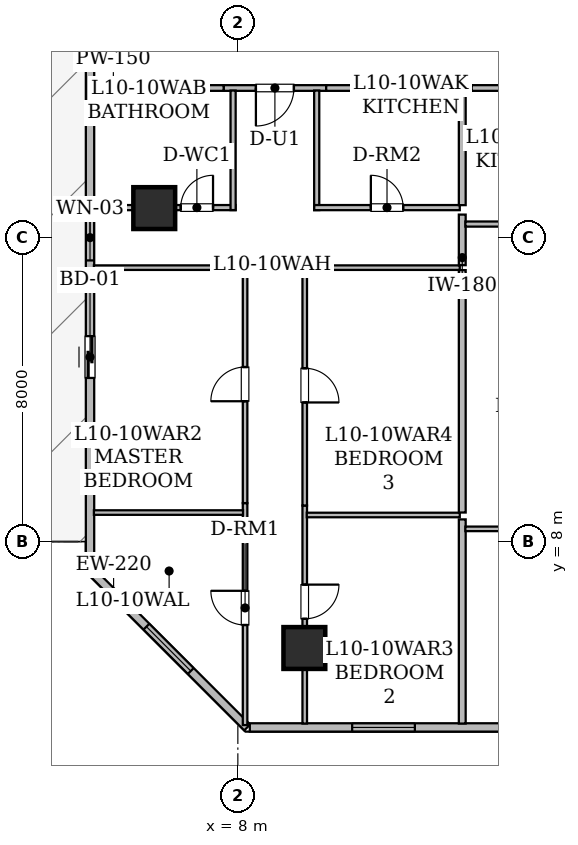
"""IFC4 building model, lengths in metres.
Left out: names, types, materials, properties, quantities, classifications, styles, units other than length and angle.
Written with IfcOpenShell. Run it as: python <this file> out.ifc"""

import sys

from ifc_helpers import new_model, si_unit, direction, frame, frame_2d, origin, origin_2d, place, context, subcontext, project, spatial, rectangle, hollow_rectangle, extrude, element, fill, save


model = new_model("IFC4")
c1 = context("Model", 3, precision=1e-05, world=origin(), true_north=direction((0.0, 1.0)))
c2 = subcontext(c1, "Body", "Model", "MODEL_VIEW")
j1 = project(units=[si_unit("LENGTHUNIT", "METRE"), si_unit("PLANEANGLEUNIT", "RADIAN")], contexts=[c1])
p1 = place(None, origin())
s1 = spatial("IfcSite", under=j1, at=p1, CompositionType="ELEMENT")
p2 = place(p1, origin())
s2 = spatial("IfcBuilding", under=s1, at=p2, CompositionType="ELEMENT")
p3 = place(p2, frame((0.0, 0.0, 44.25)))
s3 = spatial("IfcBuildingStorey", under=s2, at=p3, CompositionType="ELEMENT", Elevation=44.25)
for number, where, z_axis, x_axis in (
    (1, (9.75, 5.2, 0.0), (0.0, 0.0, 1.0), (1.0, 0.0, 0.0)),
    (2, (5.8, 16.775, 0.0), (0.0, 0.0, 1.0), (1.0, 0.0, 0.0)),
):
    element("IfcColumn", number, at=place(p3, frame(where, z_axis=z_axis, x_axis=x_axis)), inside=s3, PredefinedType="COLUMN", context=c2, shape_type="SweptSolid", body=[
        extrude(hollow_rectangle(XDim=1.1, YDim=1.1, WallThickness=0.055, at=origin_2d()), origin(), (0.0, 0.0, 1.0), 3.65),
    ])
p4 = place(p3, frame((8.246, 3.11, 0.0), z_axis=(0.0, 0.0, 1.0), x_axis=(-0.707106781187, 0.707106781187, 0.0)))
e3 = element("IfcWall", 3, at=p4, inside=s3, PredefinedType="STANDARD", context=c2, shape_type="SweptSolid", body=[
    extrude(rectangle(XDim=5.849, YDim=0.22, at=frame_2d((2.925, 0.0))), origin(), (0.0, 0.0, 1.0), 3.43),
])
p5 = place(p4, frame((2.1, 0.0, 0.85)))
e4 = element("IfcOpeningElement", 4, at=p5, cuts=e3, PredefinedType="OPENING", context=c2, shape_type="SweptSolid", body=[
    extrude(rectangle(XDim=1.65, YDim=1.55, at=frame_2d((0.825, 0.775))), frame((0.0, 0.12, 0.0), z_axis=(0.0, -1.0, 0.0), x_axis=(1.0, 0.0, 0.0)), (0.0, 0.0, 1.0), 0.24),
])
p6 = place(p3, frame((4.11, 7.317, 0.0), z_axis=(0.0, 0.0, 1.0), x_axis=(0.0, 1.0, 0.0)))
e5 = element("IfcWall", 5, at=p6, inside=s3, PredefinedType="STANDARD", context=c2, shape_type="SweptSolid", body=[
    extrude(rectangle(XDim=17.446, YDim=0.22, at=frame_2d((8.723, 0.0))), origin(), (0.0, 0.0, 1.0), 3.43),
])
p7 = place(p6, frame((4.989, 0.0, 0.0)))
e6 = element("IfcOpeningElement", 6, at=p7, cuts=e5, PredefinedType="OPENING", context=c2, shape_type="SweptSolid", body=[
    extrude(rectangle(XDim=1.1, YDim=2.2, at=frame_2d((0.55, 1.1))), frame((0.0, 0.12, 0.0), z_axis=(0.0, -1.0, 0.0), x_axis=(1.0, 0.0, 0.0)), (0.0, 0.0, 1.0), 0.24),
])
p8 = place(p6, frame((8.081, 0.0, 0.8)))
e7 = element("IfcOpeningElement", 7, at=p8, cuts=e5, PredefinedType="OPENING", context=c2, shape_type="SweptSolid", body=[
    extrude(rectangle(XDim=1.2, YDim=1.5, at=frame_2d((0.6, 0.75))), frame((0.0, 0.12, 0.0), z_axis=(0.0, -1.0, 0.0), x_axis=(1.0, 0.0, 0.0)), (0.0, 0.0, 1.0), 0.24),
])
p9 = place(p3, frame((45.683, 3.11, 0.0), z_axis=(0.0, 0.0, 1.0), x_axis=(-1.0, 0.0, 0.0)))
e8 = element("IfcWall", 8, at=p9, inside=s3, PredefinedType="STANDARD", context=c2, shape_type="SweptSolid", body=[
    extrude(rectangle(XDim=37.368, YDim=0.22, at=frame_2d((18.684, 0.0))), origin(), (0.0, 0.0, 1.0), 3.43),
])
p10 = place(p9, frame((14.508, 0.0, 0.85)))
e9 = element("IfcOpeningElement", 9, at=p10, cuts=e8, PredefinedType="OPENING", context=c2, shape_type="SweptSolid", body=[
    extrude(rectangle(XDim=1.65, YDim=1.55, at=frame_2d((0.825, 0.775))), frame((0.0, 0.12, 0.0), z_axis=(0.0, -1.0, 0.0), x_axis=(1.0, 0.0, 0.0)), (0.0, 0.0, 1.0), 0.24),
])
p11 = place(p9, frame((33.025, 0.0, 0.85)))
e10 = element("IfcOpeningElement", 10, at=p11, cuts=e8, PredefinedType="OPENING", context=c2, shape_type="SweptSolid", body=[
    extrude(rectangle(XDim=1.65, YDim=1.55, at=frame_2d((0.825, 0.775))), frame((0.0, 0.12, 0.0), z_axis=(0.0, -1.0, 0.0), x_axis=(1.0, 0.0, 0.0)), (0.0, 0.0, 1.0), 0.24),
])
p12 = place(p9, frame((24.713, 0.0, 0.8)))
e11 = element("IfcOpeningElement", 11, at=p12, cuts=e8, PredefinedType="OPENING", context=c2, shape_type="SweptSolid", body=[
    extrude(rectangle(XDim=1.2, YDim=1.5, at=frame_2d((0.6, 0.75))), frame((0.0, 0.12, 0.0), z_axis=(0.0, -1.0, 0.0), x_axis=(1.0, 0.0, 0.0)), (0.0, 0.0, 1.0), 0.24),
])
p13 = place(p9, frame((28.113, 0.0, 0.85)))
e12 = element("IfcOpeningElement", 12, at=p13, cuts=e8, PredefinedType="OPENING", context=c2, shape_type="SweptSolid", body=[
    extrude(rectangle(XDim=1.65, YDim=1.55, at=frame_2d((0.825, 0.775))), frame((0.0, 0.12, 0.0), z_axis=(0.0, -1.0, 0.0), x_axis=(1.0, 0.0, 0.0)), (0.0, 0.0, 1.0), 0.24),
])
p14 = place(p9, frame((20.863, 0.0, 0.85)))
e13 = element("IfcOpeningElement", 13, at=p14, cuts=e8, PredefinedType="OPENING", context=c2, shape_type="SweptSolid", body=[
    extrude(rectangle(XDim=1.65, YDim=1.55, at=frame_2d((0.825, 0.775))), frame((0.0, 0.12, 0.0), z_axis=(0.0, -1.0, 0.0), x_axis=(1.0, 0.0, 0.0)), (0.0, 0.0, 1.0), 0.24),
])
p15 = place(p9, frame((10.428, 0.0, 0.8)))
e14 = element("IfcOpeningElement", 14, at=p15, cuts=e8, PredefinedType="OPENING", context=c2, shape_type="SweptSolid", body=[
    extrude(rectangle(XDim=1.2, YDim=1.5, at=frame_2d((0.6, 0.75))), frame((0.0, 0.12, 0.0), z_axis=(0.0, -1.0, 0.0), x_axis=(1.0, 0.0, 0.0)), (0.0, 0.0, 1.0), 0.24),
])
p16 = place(p9, frame((6.453, 0.0, 0.85)))
e15 = element("IfcOpeningElement", 15, at=p16, cuts=e8, PredefinedType="OPENING", context=c2, shape_type="SweptSolid", body=[
    extrude(rectangle(XDim=1.65, YDim=1.55, at=frame_2d((0.825, 0.775))), frame((0.0, 0.12, 0.0), z_axis=(0.0, -1.0, 0.0), x_axis=(1.0, 0.0, 0.0)), (0.0, 0.0, 1.0), 0.24),
])
p17 = place(p9, frame((2.157, 0.0, 0.85)))
e16 = element("IfcOpeningElement", 16, at=p17, cuts=e8, PredefinedType="OPENING", context=c2, shape_type="SweptSolid", body=[
    extrude(rectangle(XDim=1.65, YDim=1.55, at=frame_2d((0.825, 0.775))), frame((0.0, 0.12, 0.0), z_axis=(0.0, -1.0, 0.0), x_axis=(1.0, 0.0, 0.0)), (0.0, 0.0, 1.0), 0.24),
])
p18 = place(p3, frame((10.324, 19.935, 0.0), z_axis=(0.0, 0.0, 1.0), x_axis=(-1.0, 0.0, 0.0)))
e17 = element("IfcWall", 17, at=p18, inside=s3, PredefinedType="STANDARD", context=c2, shape_type="SweptSolid", body=[
    extrude(rectangle(XDim=2.698, YDim=0.15, at=frame_2d((1.349, 0.0))), origin(), (0.0, 0.0, 1.0), 3.43),
])
p19 = place(p18, frame((0.849, 0.0, 0.0)))
e18 = element("IfcOpeningElement", 18, at=p19, cuts=e17, PredefinedType="OPENING", context=c2, shape_type="SweptSolid", body=[
    extrude(rectangle(XDim=1.0, YDim=2.15, at=frame_2d((0.5, 1.075))), frame((0.0, 0.085, 0.0), z_axis=(0.0, -1.0, 0.0), x_axis=(1.0, 0.0, 0.0)), (0.0, 0.0, 1.0), 0.17),
])
p20 = place(p3, frame((7.626, 19.935, 0.0), z_axis=(0.0, 0.0, 1.0), x_axis=(-1.0, 0.0, 0.0)))
e19 = element("IfcWall", 19, at=p20, inside=s3, PredefinedType="STANDARD", context=c2, shape_type="SweptSolid", body=[
    extrude(rectangle(XDim=3.414, YDim=0.15, at=frame_2d((1.707, 0.0))), origin(), (0.0, 0.0, 1.0), 2.803),
])
p21 = place(p3, frame((14.154, 19.935, 0.0), z_axis=(0.0, 0.0, 1.0), x_axis=(-1.0, 0.0, 0.0)))
e20 = element("IfcWall", 20, at=p21, inside=s3, PredefinedType="STANDARD", context=c2, shape_type="SweptSolid", body=[
    extrude(rectangle(XDim=3.83, YDim=0.15, at=frame_2d((1.915, 0.0))), origin(), (0.0, 0.0, 1.0), 3.43),
])
p22 = place(p3, frame((19.021, 19.935, 0.0), z_axis=(0.0, 0.0, 1.0), x_axis=(-1.0, 0.0, 0.0)))
e21 = element("IfcWall", 21, at=p22, inside=s3, PredefinedType="STANDARD", context=c2, shape_type="SweptSolid", body=[
    extrude(rectangle(XDim=4.867, YDim=0.15, at=frame_2d((2.434, 0.0))), origin(), (0.0, 0.0, 1.0), 2.647),
])
p23 = place(p3, frame((4.212, 16.788, 0.0), z_axis=(0.0, 0.0, 1.0), x_axis=(1.0, 0.0, 0.0)))
e22 = element("IfcWall", 22, at=p23, inside=s3, PredefinedType="PARTITIONING", context=c2, shape_type="SweptSolid", body=[
    extrude(rectangle(XDim=3.728, YDim=0.135, at=frame_2d((1.864, 0.0))), origin(), (0.0, 0.0, 1.0), 2.647),
])
p24 = place(p23, frame((2.285, 0.0, 0.0)))
e23 = element("IfcOpeningElement", 23, at=p24, cuts=e22, PredefinedType="OPENING", context=c2, shape_type="SweptSolid", body=[
    extrude(rectangle(XDim=0.85, YDim=2.1, at=frame_2d((0.425, 1.05))), frame((0.0, 0.077, 0.0), z_axis=(0.0, -1.0, 0.0), x_axis=(1.0, 0.0, 0.0)), (0.0, 0.0, 1.0), 0.155),
])
for number, where, z_axis, x_axis in (
    (24, (7.875, 16.723, 0.0), (0.0, 0.0, 1.0), (0.0, 1.0, 0.0)),
    (25, (10.075, 19.868, 0.0), (0.0, 0.0, 1.0), (0.0, -1.0, 0.0)),
):
    element("IfcWall", number, at=place(p3, frame(where, z_axis=z_axis, x_axis=x_axis)), inside=s3, PredefinedType="PARTITIONING", context=c2, shape_type="SweptSolid", body=[
        extrude(rectangle(XDim=3.145, YDim=0.135, at=frame_2d((1.573, 0.0))), origin(), (0.0, 0.0, 1.0), 2.647),
    ])
p25 = place(p3, frame((10.01, 16.788, 0.0), z_axis=(0.0, 0.0, 1.0), x_axis=(1.0, 0.0, 0.0)))
e26 = element("IfcWall", 26, at=p25, inside=s3, PredefinedType="PARTITIONING", context=c2, shape_type="SweptSolid", body=[
    extrude(rectangle(XDim=3.83, YDim=0.135, at=frame_2d((1.915, 0.0))), origin(), (0.0, 0.0, 1.0), 2.647),
])
p26 = place(p25, frame((1.49, 0.0, 0.0)))
e27 = element("IfcOpeningElement", 27, at=p26, cuts=e26, PredefinedType="OPENING", context=c2, shape_type="SweptSolid", body=[
    extrude(rectangle(XDim=0.85, YDim=2.1, at=frame_2d((0.425, 1.05))), frame((0.0, 0.077, 0.0), z_axis=(0.0, -1.0, 0.0), x_axis=(1.0, 0.0, 0.0)), (0.0, 0.0, 1.0), 0.155),
])
p27 = place(p3, frame((8.19, 3.172, 0.0), z_axis=(0.0, 0.0, 1.0), x_axis=(0.0, 1.0, 0.0)))
e28 = element("IfcWall", 28, at=p27, inside=s3, PredefinedType="PARTITIONING", context=c2, shape_type="SweptSolid", body=[
    extrude(rectangle(XDim=5.841, YDim=0.12, at=frame_2d((2.92, 0.0))), origin(), (0.0, 0.0, 1.0), 2.803),
])
p28 = place(p27, frame((2.633, 0.0, 0.0)))
e29 = element("IfcOpeningElement", 29, at=p28, cuts=e28, PredefinedType="OPENING", context=c2, shape_type="SweptSolid", body=[
    extrude(rectangle(XDim=0.9, YDim=2.1, at=frame_2d((0.45, 1.05))), frame((0.0, 0.07, 0.0), z_axis=(0.0, -1.0, 0.0), x_axis=(1.0, 0.0, 0.0)), (0.0, 0.0, 1.0), 0.14),
])
p29 = place(p3, frame((8.19, 9.013, 0.0), z_axis=(0.0, 0.0, 1.0), x_axis=(0.0, 1.0, 0.0)))
e30 = element("IfcWall", 30, at=p29, inside=s3, PredefinedType="PARTITIONING", context=c2, shape_type="SweptSolid", body=[
    extrude(rectangle(XDim=6.26, YDim=0.12, at=frame_2d((3.13, 0.0))), origin(), (0.0, 0.0, 1.0), 2.803),
])
p30 = place(p29, frame((2.68, 0.0, 0.0)))
e31 = element("IfcOpeningElement", 31, at=p30, cuts=e30, PredefinedType="OPENING", context=c2, shape_type="SweptSolid", body=[
    extrude(rectangle(XDim=0.9, YDim=2.1, at=frame_2d((0.45, 1.05))), frame((0.0, 0.07, 0.0), z_axis=(0.0, -1.0, 0.0), x_axis=(1.0, 0.0, 0.0)), (0.0, 0.0, 1.0), 0.14),
])
p31 = place(p3, frame((8.255, 15.208, 0.0), z_axis=(0.0, 0.0, 1.0), x_axis=(-1.0, 0.0, 0.0)))
e32 = element("IfcWall", 32, at=p31, inside=s3, PredefinedType="PARTITIONING", context=c2, shape_type="SweptSolid", body=[
    extrude(rectangle(XDim=4.043, YDim=0.12, at=frame_2d((2.021, 0.0))), origin(), (0.0, 0.0, 1.0), 2.803),
])
p32 = place(p3, frame((9.76, 8.949, 0.0), z_axis=(0.0, 0.0, 1.0), x_axis=(0.0, -1.0, 0.0)))
e33 = element("IfcWall", 33, at=p32, inside=s3, PredefinedType="PARTITIONING", context=c2, shape_type="SweptSolid", body=[
    extrude(rectangle(XDim=5.737, YDim=0.12, at=frame_2d((2.869, 0.0))), origin(), (0.0, 0.0, 1.0), 2.647),
])
p33 = place(p32, frame((2.081, 0.0, 0.0)))
e34 = element("IfcOpeningElement", 34, at=p33, cuts=e33, PredefinedType="OPENING", context=c2, shape_type="SweptSolid", body=[
    extrude(rectangle(XDim=0.9, YDim=2.1, at=frame_2d((0.45, 1.05))), frame((0.0, 0.07, 0.0), z_axis=(0.0, -1.0, 0.0), x_axis=(1.0, 0.0, 0.0)), (0.0, 0.0, 1.0), 0.14),
])
p34 = place(p3, frame((9.76, 15.273, 0.0), z_axis=(0.0, 0.0, 1.0), x_axis=(0.0, -1.0, 0.0)))
e35 = element("IfcWall", 35, at=p34, inside=s3, PredefinedType="PARTITIONING", context=c2, shape_type="SweptSolid", body=[
    extrude(rectangle(XDim=6.324, YDim=0.12, at=frame_2d((3.162, 0.0))), origin(), (0.0, 0.0, 1.0), 3.43),
])
p35 = place(p34, frame((2.712, 0.0, 0.0)))
e36 = element("IfcOpeningElement", 36, at=p35, cuts=e35, PredefinedType="OPENING", context=c2, shape_type="SweptSolid", body=[
    extrude(rectangle(XDim=0.9, YDim=2.1, at=frame_2d((0.45, 1.05))), frame((0.0, 0.07, 0.0), z_axis=(0.0, -1.0, 0.0), x_axis=(1.0, 0.0, 0.0)), (0.0, 0.0, 1.0), 0.14),
])
p36 = place(p3, frame((13.84, 15.208, 0.0), z_axis=(0.0, 0.0, 1.0), x_axis=(-1.0, 0.0, 0.0)))
e37 = element("IfcWall", 37, at=p36, inside=s3, PredefinedType="PARTITIONING", context=c2, shape_type="SweptSolid", body=[
    extrude(rectangle(XDim=4.145, YDim=0.12, at=frame_2d((2.073, 0.0))), origin(), (0.0, 0.0, 1.0), 3.43),
])
p37 = place(p3, frame((13.905, 16.604, 0.0), z_axis=(0.0, 0.0, 1.0), x_axis=(0.0, -1.0, 0.0)))
e38 = element("IfcWall", 38, at=p37, inside=s3, PredefinedType="STANDARD", context=c2, shape_type="SweptSolid", body=[
    extrude(rectangle(XDim=1.331, YDim=0.18, at=frame_2d((0.666, 0.0))), origin(), (0.0, 0.0, 1.0), 3.43),
])
p38 = place(p3, frame((13.905, 19.868, 0.0), z_axis=(0.0, 0.0, 1.0), x_axis=(0.0, -1.0, 0.0)))
e39 = element("IfcWall", 39, at=p38, inside=s3, PredefinedType="STANDARD", context=c2, shape_type="SweptSolid", body=[
    extrude(rectangle(XDim=3.015, YDim=0.18, at=frame_2d((1.507, 0.0))), origin(), (0.0, 0.0, 1.0), 2.647),
])
p39 = place(p3, frame((4.212, 8.764, 0.0), z_axis=(0.0, 0.0, 1.0), x_axis=(1.0, 0.0, 0.0)))
e40 = element("IfcWall", 40, at=p39, inside=s3, PredefinedType="PARTITIONING", context=c2, shape_type="SweptSolid", body=[
    extrude(rectangle(XDim=3.924, YDim=0.12, at=frame_2d((1.962, 0.0))), origin(), (0.0, 0.0, 1.0), 3.43),
])
p40 = place(p3, frame((9.814, 8.7, 0.0), z_axis=(0.0, 0.0, 1.0), x_axis=(1.0, 0.0, 0.0)))
e41 = element("IfcWall", 41, at=p40, inside=s3, PredefinedType="PARTITIONING", context=c2, shape_type="SweptSolid", body=[
    extrude(rectangle(XDim=4.026, YDim=0.12, at=frame_2d((2.013, 0.0))), origin(), (0.0, 0.0, 1.0), 2.647),
])
p41 = place(p3, frame((13.905, 8.584, 0.0), z_axis=(0.0, 0.0, 1.0), x_axis=(0.0, -1.0, 0.0)))
e42 = element("IfcWall", 42, at=p41, inside=s3, PredefinedType="STANDARD", context=c2, shape_type="SweptSolid", body=[
    extrude(rectangle(XDim=5.372, YDim=0.18, at=frame_2d((2.686, 0.0))), origin(), (0.0, 0.0, 1.0), 2.803),
])
p42 = place(p3, frame((13.905, 15.143, 0.0), z_axis=(0.0, 0.0, 1.0), x_axis=(0.0, -1.0, 0.0)))
e43 = element("IfcWall", 43, at=p42, inside=s3, PredefinedType="STANDARD", context=c2, shape_type="SweptSolid", body=[
    extrude(rectangle(XDim=0.617, YDim=0.18, at=frame_2d((0.309, 0.0))), origin(), (0.0, 0.0, 1.0), 3.43),
])
p43 = place(p3, frame((13.905, 14.526, 0.0), z_axis=(0.0, 0.0, 1.0), x_axis=(0.0, -1.0, 0.0)))
e44 = element("IfcWall", 44, at=p43, inside=s3, PredefinedType="STANDARD", context=c2, shape_type="SweptSolid", body=[
    extrude(rectangle(XDim=5.761, YDim=0.18, at=frame_2d((2.88, 0.0))), origin(), (0.0, 0.0, 1.0), 2.647),
])
p44 = place(p3, frame((13.987, 16.355, 0.0), z_axis=(0.0, 0.0, 1.0), x_axis=(1.0, 0.0, 0.0)))
e45 = element("IfcWall", 45, at=p44, inside=s3, PredefinedType="PARTITIONING", context=c2, shape_type="SweptSolid", body=[
    extrude(rectangle(XDim=5.348, YDim=0.135, at=frame_2d((2.674, 0.0))), origin(), (0.0, 0.0, 1.0), 2.647),
])
p45 = place(p44, frame((2.249, 0.0, 0.0)))
e46 = element("IfcOpeningElement", 46, at=p45, cuts=e45, PredefinedType="OPENING", context=c2, shape_type="SweptSolid", body=[
    extrude(rectangle(XDim=0.85, YDim=2.1, at=frame_2d((0.425, 1.05))), frame((0.0, 0.077, 0.0), z_axis=(0.0, -1.0, 0.0), x_axis=(1.0, 0.0, 0.0)), (0.0, 0.0, 1.0), 0.155),
])
p46 = place(p3, frame((19.65, 14.775, 0.0), z_axis=(0.0, 0.0, 1.0), x_axis=(-1.0, 0.0, 0.0)))
e47 = element("IfcWall", 47, at=p46, inside=s3, PredefinedType="PARTITIONING", context=c2, shape_type="SweptSolid", body=[
    extrude(rectangle(XDim=5.663, YDim=0.12, at=frame_2d((2.832, 0.0))), origin(), (0.0, 0.0, 1.0), 2.647),
])
p47 = place(p3, frame((13.987, 8.335, 0.0), z_axis=(0.0, 0.0, 1.0), x_axis=(1.0, 0.0, 0.0)))
e48 = element("IfcWall", 48, at=p47, inside=s3, PredefinedType="PARTITIONING", context=c2, shape_type="SweptSolid", body=[
    extrude(rectangle(XDim=5.544, YDim=0.12, at=frame_2d((2.772, 0.0))), origin(), (0.0, 0.0, 1.0), 3.43),
])
p48 = place(p7, origin())
e49 = element("IfcDoor", 49, at=p48, inside=s3, OperationType="SLIDING_TO_LEFT", PredefinedType="DOOR", context=c2, shape_type="SweptSolid", body=[
    extrude(rectangle(XDim=1.1, YDim=2.2, at=frame_2d((0.55, 1.1))), frame((0.0, 0.025, 0.0), z_axis=(0.0, -1.0, 0.0), x_axis=(1.0, 0.0, 0.0)), (0.0, 0.0, 1.0), 0.05),
])
fill(e6, e49)
p49 = place(p8, origin())
e50 = element("IfcWindow", 50, at=p49, inside=s3, PartitioningType="SINGLE_PANEL", PredefinedType="WINDOW", context=c2, shape_type="SweptSolid", body=[
    extrude(rectangle(XDim=1.2, YDim=1.5, at=frame_2d((0.6, 0.75))), frame((0.0, 0.03, 0.0), z_axis=(0.0, -1.0, 0.0), x_axis=(1.0, 0.0, 0.0)), (0.0, 0.0, 1.0), 0.06),
])
fill(e7, e50)
p50 = place(p5, origin())
e51 = element("IfcWindow", 51, at=p50, inside=s3, PartitioningType="SINGLE_PANEL", PredefinedType="WINDOW", context=c2, shape_type="SweptSolid", body=[
    extrude(rectangle(XDim=1.65, YDim=1.55, at=frame_2d((0.825, 0.775))), frame((0.0, 0.03, 0.0), z_axis=(0.0, -1.0, 0.0), x_axis=(1.0, 0.0, 0.0)), (0.0, 0.0, 1.0), 0.06),
])
fill(e4, e51)
p51 = place(p11, origin())
e52 = element("IfcWindow", 52, at=p51, inside=s3, PartitioningType="SINGLE_PANEL", PredefinedType="WINDOW", context=c2, shape_type="SweptSolid", body=[
    extrude(rectangle(XDim=1.65, YDim=1.55, at=frame_2d((0.825, 0.775))), frame((0.0, 0.03, 0.0), z_axis=(0.0, -1.0, 0.0), x_axis=(1.0, 0.0, 0.0)), (0.0, 0.0, 1.0), 0.06),
])
fill(e10, e52)
p52 = place(p19, origin())
e53 = element("IfcDoor", 53, at=p52, inside=s3, OperationType="SINGLE_SWING_RIGHT", PredefinedType="DOOR", context=c2, shape_type="SweptSolid", body=[
    extrude(rectangle(XDim=1.0, YDim=2.15, at=frame_2d((0.5, 1.075))), frame((0.0, 0.025, 0.0), z_axis=(0.0, -1.0, 0.0), x_axis=(1.0, 0.0, 0.0)), (0.0, 0.0, 1.0), 0.05),
])
fill(e18, e53)
p53 = place(p24, origin())
e54 = element("IfcDoor", 54, at=p53, inside=s3, OperationType="SINGLE_SWING_RIGHT", PredefinedType="DOOR", context=c2, shape_type="SweptSolid", body=[
    extrude(rectangle(XDim=0.85, YDim=2.1, at=frame_2d((0.425, 1.05))), frame((0.0, 0.025, 0.0), z_axis=(0.0, -1.0, 0.0), x_axis=(1.0, 0.0, 0.0)), (0.0, 0.0, 1.0), 0.05),
])
fill(e23, e54)
p54 = place(p26, origin())
e55 = element("IfcDoor", 55, at=p54, inside=s3, OperationType="SINGLE_SWING_LEFT", PredefinedType="DOOR", context=c2, shape_type="SweptSolid", body=[
    extrude(rectangle(XDim=0.85, YDim=2.1, at=frame_2d((0.425, 1.05))), frame((0.0, 0.025, 0.0), z_axis=(0.0, -1.0, 0.0), x_axis=(1.0, 0.0, 0.0)), (0.0, 0.0, 1.0), 0.05),
])
fill(e27, e55)
p55 = place(p28, origin())
e56 = element("IfcDoor", 56, at=p55, inside=s3, OperationType="SINGLE_SWING_RIGHT", PredefinedType="DOOR", context=c2, shape_type="SweptSolid", body=[
    extrude(rectangle(XDim=0.9, YDim=2.1, at=frame_2d((0.45, 1.05))), frame((0.0, 0.025, 0.0), z_axis=(0.0, -1.0, 0.0), x_axis=(1.0, 0.0, 0.0)), (0.0, 0.0, 1.0), 0.05),
])
fill(e29, e56)
p56 = place(p30, origin())
e57 = element("IfcDoor", 57, at=p56, inside=s3, OperationType="SINGLE_SWING_LEFT", PredefinedType="DOOR", context=c2, shape_type="SweptSolid", body=[
    extrude(rectangle(XDim=0.9, YDim=2.1, at=frame_2d((0.45, 1.05))), frame((0.0, 0.025, 0.0), z_axis=(0.0, -1.0, 0.0), x_axis=(1.0, 0.0, 0.0)), (0.0, 0.0, 1.0), 0.05),
])
fill(e31, e57)
p57 = place(p33, origin())
e58 = element("IfcDoor", 58, at=p57, inside=s3, OperationType="SINGLE_SWING_LEFT", PredefinedType="DOOR", context=c2, shape_type="SweptSolid", body=[
    extrude(rectangle(XDim=0.9, YDim=2.1, at=frame_2d((0.45, 1.05))), frame((0.0, 0.025, 0.0), z_axis=(0.0, -1.0, 0.0), x_axis=(1.0, 0.0, 0.0)), (0.0, 0.0, 1.0), 0.05),
])
fill(e34, e58)
p58 = place(p35, origin())
e59 = element("IfcDoor", 59, at=p58, inside=s3, OperationType="SINGLE_SWING_RIGHT", PredefinedType="DOOR", context=c2, shape_type="SweptSolid", body=[
    extrude(rectangle(XDim=0.9, YDim=2.1, at=frame_2d((0.45, 1.05))), frame((0.0, 0.025, 0.0), z_axis=(0.0, -1.0, 0.0), x_axis=(1.0, 0.0, 0.0)), (0.0, 0.0, 1.0), 0.05),
])
fill(e36, e59)
save(model, sys.argv[1])
